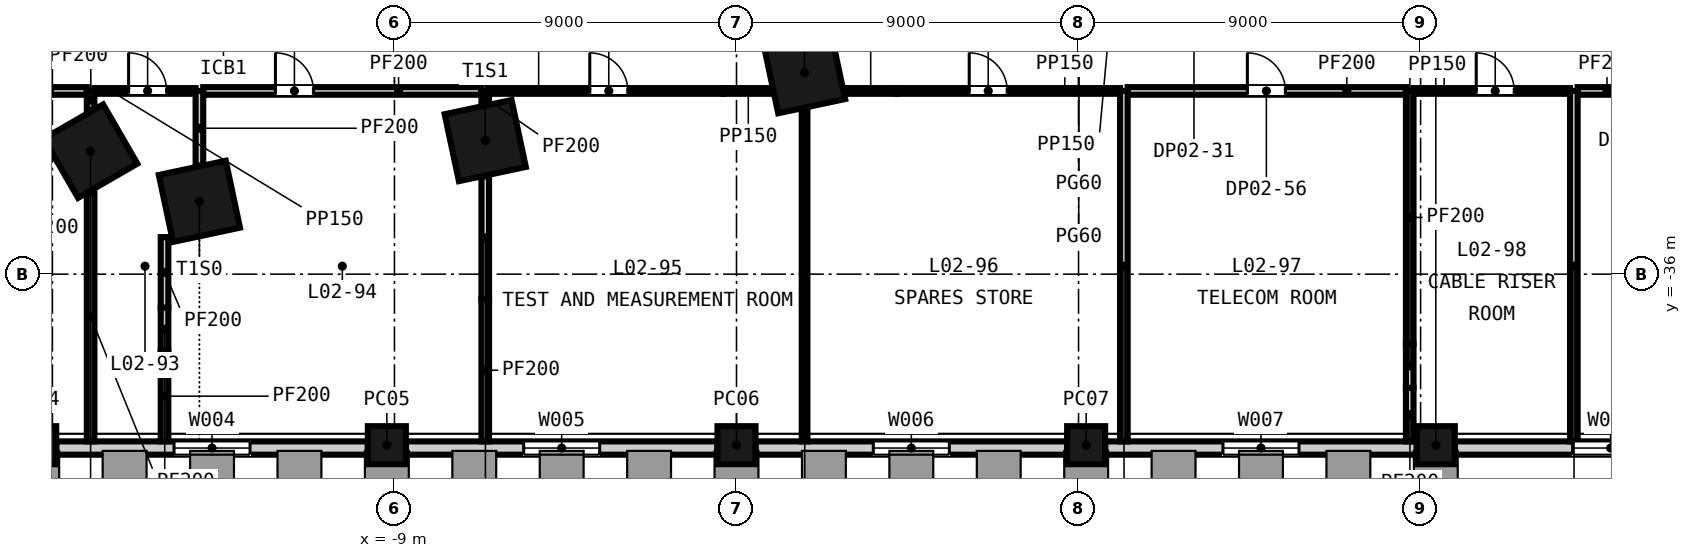
"""IFC4 building model, lengths in metres.
Left out: names, types, materials, properties, quantities, classifications, styles, units other than length and angle.
Written with IfcOpenShell. Run it as: python <this file> out.ifc"""

import sys

from ifc_helpers import new_model, si_unit, direction, frame, frame_2d, origin, origin_2d, place, context, subcontext, project, spatial, rectangle, extrude, element, fill, save


model = new_model("IFC4")
c1 = context("Model", 3, precision=1e-05, world=origin(), true_north=direction((0.0, 1.0)))
c2 = subcontext(c1, "Body", "Model", "MODEL_VIEW")
j1 = project(units=[si_unit("LENGTHUNIT", "METRE"), si_unit("PLANEANGLEUNIT", "RADIAN")], contexts=[c1])
p1 = place(None, origin())
s1 = spatial("IfcSite", under=j1, at=p1, CompositionType="ELEMENT")
p2 = place(p1, origin())
s2 = spatial("IfcBuilding", under=s1, at=p2, CompositionType="ELEMENT")
p3 = place(p2, frame((0.0, 0.0, 18.0)))
s3 = spatial("IfcBuildingStorey", under=s2, at=p3, CompositionType="ELEMENT", Elevation=18.0)
for number, where, z_axis, x_axis in (
    (1, (-16.995, -32.763, -0.4), (0.0, 0.0, 1.0), (0.5, -0.866, 0.0)),
    (2, (-14.132, -34.084, -0.4), (0.0, 0.0, 1.0), (0.978, 0.208, 0.0)),
    (3, (-6.611, -32.485, -0.4), (0.0, 0.0, 1.0), (0.978, 0.208, 0.0)),
    (4, (1.791, -30.699, -0.4), (0.0, 0.0, 1.0), (0.978, 0.208, 0.0)),
):
    element("IfcColumn", number, at=place(p3, frame(where, z_axis=z_axis, x_axis=x_axis)), inside=s3, PredefinedType="COLUMN", context=c2, shape_type="SweptSolid", body=[
        extrude(rectangle(XDim=1.8, YDim=1.8, at=origin_2d()), origin(), (0.0, 0.0, 1.0), 4.6),
    ])
for number, where, z_axis, x_axis in (
    (5, (-18.4, -40.5, -0.4), (0.0, 0.0, 1.0), (1.0, 0.0, 0.0)),
    (6, (-9.2, -40.5, -0.4), (0.0, 0.0, 1.0), (1.0, 0.0, 0.0)),
    (7, (0.0, -40.5, -0.4), (0.0, 0.0, 1.0), (1.0, 0.0, 0.0)),
    (8, (9.2, -40.5, -0.4), (0.0, 0.0, 1.0), (1.0, 0.0, 0.0)),
    (9, (18.4, -40.5, -0.4), (0.0, 0.0, 1.0), (1.0, 0.0, 0.0)),
):
    element("IfcColumn", number, at=place(p3, frame(where, z_axis=z_axis, x_axis=x_axis)), inside=s3, PredefinedType="COLUMN", context=c2, shape_type="SweptSolid", body=[
        extrude(rectangle(XDim=1.0, YDim=1.0, at=origin_2d()), origin(), (0.0, 0.0, 1.0), 4.6),
    ])
p4 = place(p3, frame((-17.9, -40.575, -0.4), z_axis=(0.0, 0.0, 1.0), x_axis=(1.0, 0.0, 0.0)))
e10 = element("IfcWall", 10, at=p4, inside=s3, PredefinedType="SOLIDWALL", context=c2, shape_type="SweptSolid", body=[
    extrude(rectangle(XDim=8.2, YDim=0.35, at=frame_2d((4.1, 0.0))), origin(), (0.0, 0.0, 1.0), 3.7),
])
p5 = place(p4, frame((3.1, 0.0, 1.3)))
e11 = element("IfcOpeningElement", 11, at=p5, cuts=e10, PredefinedType="OPENING", context=c2, shape_type="SweptSolid", body=[
    extrude(rectangle(XDim=2.0, YDim=2.35, at=frame_2d((1.0, 1.175))), frame((0.0, 0.185, 0.0), z_axis=(0.0, -1.0, 0.0), x_axis=(1.0, 0.0, 0.0)), (0.0, 0.0, 1.0), 0.37),
])
p6 = place(p3, frame((-8.7, -40.575, -0.4), z_axis=(0.0, 0.0, 1.0), x_axis=(1.0, 0.0, 0.0)))
e12 = element("IfcWall", 12, at=p6, inside=s3, PredefinedType="SOLIDWALL", context=c2, shape_type="SweptSolid", body=[
    extrude(rectangle(XDim=8.2, YDim=0.35, at=frame_2d((4.1, 0.0))), origin(), (0.0, 0.0, 1.0), 3.7),
])
p7 = place(p6, frame((3.1, 0.0, 1.3)))
e13 = element("IfcOpeningElement", 13, at=p7, cuts=e12, PredefinedType="OPENING", context=c2, shape_type="SweptSolid", body=[
    extrude(rectangle(XDim=2.0, YDim=2.35, at=frame_2d((1.0, 1.175))), frame((0.0, 0.185, 0.0), z_axis=(0.0, -1.0, 0.0), x_axis=(1.0, 0.0, 0.0)), (0.0, 0.0, 1.0), 0.37),
])
p8 = place(p3, frame((0.5, -40.575, -0.4), z_axis=(0.0, 0.0, 1.0), x_axis=(1.0, 0.0, 0.0)))
e14 = element("IfcWall", 14, at=p8, inside=s3, PredefinedType="SOLIDWALL", context=c2, shape_type="SweptSolid", body=[
    extrude(rectangle(XDim=8.2, YDim=0.35, at=frame_2d((4.1, 0.0))), origin(), (0.0, 0.0, 1.0), 3.7),
])
p9 = place(p8, frame((3.1, 0.0, 1.3)))
e15 = element("IfcOpeningElement", 15, at=p9, cuts=e14, PredefinedType="OPENING", context=c2, shape_type="SweptSolid", body=[
    extrude(rectangle(XDim=2.0, YDim=2.35, at=frame_2d((1.0, 1.175))), frame((0.0, 0.185, 0.0), z_axis=(0.0, -1.0, 0.0), x_axis=(1.0, 0.0, 0.0)), (0.0, 0.0, 1.0), 0.37),
])
p10 = place(p3, frame((9.7, -40.575, -0.4), z_axis=(0.0, 0.0, 1.0), x_axis=(1.0, 0.0, 0.0)))
e16 = element("IfcWall", 16, at=p10, inside=s3, PredefinedType="SOLIDWALL", context=c2, shape_type="SweptSolid", body=[
    extrude(rectangle(XDim=8.2, YDim=0.35, at=frame_2d((4.1, 0.0))), origin(), (0.0, 0.0, 1.0), 3.7),
])
p11 = place(p10, frame((3.1, 0.0, 1.3)))
e17 = element("IfcOpeningElement", 17, at=p11, cuts=e16, PredefinedType="OPENING", context=c2, shape_type="SweptSolid", body=[
    extrude(rectangle(XDim=2.0, YDim=2.35, at=frame_2d((1.0, 1.175))), frame((0.0, 0.185, 0.0), z_axis=(0.0, -1.0, 0.0), x_axis=(1.0, 0.0, 0.0)), (0.0, 0.0, 1.0), 0.37),
])
p12 = place(p3, frame((18.9, -40.575, -0.4), z_axis=(0.0, 0.0, 1.0), x_axis=(1.0, 0.0, 0.0)))
e18 = element("IfcWall", 18, at=p12, inside=s3, PredefinedType="SOLIDWALL", context=c2, shape_type="SweptSolid", body=[
    extrude(rectangle(XDim=8.2, YDim=0.35, at=frame_2d((4.1, 0.0))), origin(), (0.0, 0.0, 1.0), 3.7),
])
p13 = place(p12, frame((3.1, 0.0, 1.3)))
e19 = element("IfcOpeningElement", 19, at=p13, cuts=e18, PredefinedType="OPENING", context=c2, shape_type="SweptSolid", body=[
    extrude(rectangle(XDim=2.0, YDim=2.35, at=frame_2d((1.0, 1.175))), frame((0.0, 0.185, 0.0), z_axis=(0.0, -1.0, 0.0), x_axis=(1.0, 0.0, 0.0)), (0.0, 0.0, 1.0), 0.37),
])
p14 = place(p3, frame((-19.065, -31.179, 0.0), z_axis=(0.0, 0.0, 1.0), x_axis=(1.0, 0.0, 0.0)))
e20 = element("IfcWall", 20, at=p14, inside=s3, PredefinedType="PARTITIONING", context=c2, shape_type="SweptSolid", body=[
    extrude(rectangle(XDim=1.97, YDim=0.2, at=frame_2d((0.985, 0.0))), origin(), (0.0, 0.0, 1.0), 3.2),
])
p15 = place(p3, frame((-16.895, -31.179, 0.0), z_axis=(0.0, 0.0, 1.0), x_axis=(1.0, 0.0, 0.0)))
e21 = element("IfcWall", 21, at=p15, inside=s3, PredefinedType="PARTITIONING", context=c2, shape_type="SweptSolid", body=[
    extrude(rectangle(XDim=2.663, YDim=0.15, at=frame_2d((1.332, 0.0))), origin(), (0.0, 0.0, 1.0), 4.2),
])
p16 = place(p15, frame((0.9, 0.0, 0.0)))
e22 = element("IfcOpeningElement", 22, at=p16, cuts=e21, PredefinedType="OPENING", context=c2, shape_type="SweptSolid", body=[
    extrude(rectangle(XDim=1.0, YDim=2.1, at=frame_2d((0.5, 1.05))), frame((0.0, 0.085, 0.0), z_axis=(0.0, -1.0, 0.0), x_axis=(1.0, 0.0, 0.0)), (0.0, 0.0, 1.0), 0.17),
])
p17 = place(p3, frame((-14.032, -31.179, 0.0), z_axis=(0.0, 0.0, 1.0), x_axis=(1.0, 0.0, 0.0)))
e23 = element("IfcWall", 23, at=p17, inside=s3, PredefinedType="PARTITIONING", context=c2, shape_type="SweptSolid", body=[
    extrude(rectangle(XDim=7.321, YDim=0.2, at=frame_2d((3.661, 0.0))), origin(), (0.0, 0.0, 1.0), 4.2),
])
p18 = place(p17, frame((1.9, 0.0, 0.0)))
e24 = element("IfcOpeningElement", 24, at=p18, cuts=e23, PredefinedType="OPENING", context=c2, shape_type="SweptSolid", body=[
    extrude(rectangle(XDim=1.0, YDim=2.1, at=frame_2d((0.5, 1.05))), frame((0.0, 0.11, 0.0), z_axis=(0.0, -1.0, 0.0), x_axis=(1.0, 0.0, 0.0)), (0.0, 0.0, 1.0), 0.22),
])
p19 = place(p3, frame((-6.511, -31.179, 0.0), z_axis=(0.0, 0.0, 1.0), x_axis=(1.0, 0.0, 0.0)))
e25 = element("IfcWall", 25, at=p19, inside=s3, PredefinedType="PARTITIONING", context=c2, shape_type="SweptSolid", body=[
    extrude(rectangle(XDim=6.165, YDim=0.15, at=frame_2d((3.083, 0.0))), origin(), (0.0, 0.0, 1.0), 4.2),
])
p20 = place(p19, frame((2.65, 0.0, 0.0)))
e26 = element("IfcOpeningElement", 26, at=p20, cuts=e25, PredefinedType="OPENING", context=c2, shape_type="SweptSolid", body=[
    extrude(rectangle(XDim=1.0, YDim=2.1, at=frame_2d((0.5, 1.05))), frame((0.0, 0.085, 0.0), z_axis=(0.0, -1.0, 0.0), x_axis=(1.0, 0.0, 0.0)), (0.0, 0.0, 1.0), 0.17),
])
p21 = place(p3, frame((-0.346, -31.179, 0.0), z_axis=(0.0, 0.0, 1.0), x_axis=(1.0, 0.0, 0.0)))
e27 = element("IfcWall", 27, at=p21, inside=s3, PredefinedType="PARTITIONING", context=c2, shape_type="SweptSolid", body=[
    extrude(rectangle(XDim=1.302, YDim=0.15, at=frame_2d((0.651, 0.0))), origin(), (0.0, 0.0, 1.0), 3.2),
])
p22 = place(p3, frame((2.829, -31.179, 0.0), z_axis=(0.0, 0.0, 1.0), x_axis=(1.0, 0.0, 0.0)))
e28 = element("IfcWall", 28, at=p22, inside=s3, PredefinedType="PARTITIONING", context=c2, shape_type="SweptSolid", body=[
    extrude(rectangle(XDim=1.395, YDim=0.15, at=frame_2d((0.697, 0.0))), origin(), (0.0, 0.0, 1.0), 3.2),
])
p23 = place(p3, frame((4.223, -31.179, 0.0), z_axis=(0.0, 0.0, 1.0), x_axis=(1.0, 0.0, 0.0)))
e29 = element("IfcWall", 29, at=p23, inside=s3, PredefinedType="PARTITIONING", context=c2, shape_type="SweptSolid", body=[
    extrude(rectangle(XDim=5.869, YDim=0.15, at=frame_2d((2.935, 0.0))), origin(), (0.0, 0.0, 1.0), 4.2),
])
p24 = place(p23, frame((1.9, 0.0, 0.0)))
e30 = element("IfcOpeningElement", 30, at=p24, cuts=e29, PredefinedType="OPENING", context=c2, shape_type="SweptSolid", body=[
    extrude(rectangle(XDim=1.0, YDim=2.1, at=frame_2d((0.5, 1.05))), frame((0.0, 0.085, 0.0), z_axis=(0.0, -1.0, 0.0), x_axis=(1.0, 0.0, 0.0)), (0.0, 0.0, 1.0), 0.17),
])
p25 = place(p3, frame((10.292, -31.179, 0.0), z_axis=(0.0, 0.0, 1.0), x_axis=(1.0, 0.0, 0.0)))
e31 = element("IfcWall", 31, at=p25, inside=s3, PredefinedType="PARTITIONING", context=c2, shape_type="SweptSolid", body=[
    extrude(rectangle(XDim=7.322, YDim=0.2, at=frame_2d((3.661, 0.0))), origin(), (0.0, 0.0, 1.0), 4.2),
])
p26 = place(p25, frame((3.15, 0.0, 0.0)))
e32 = element("IfcOpeningElement", 32, at=p26, cuts=e31, PredefinedType="OPENING", context=c2, shape_type="SweptSolid", body=[
    extrude(rectangle(XDim=1.0, YDim=2.1, at=frame_2d((0.5, 1.05))), frame((0.0, 0.11, 0.0), z_axis=(0.0, -1.0, 0.0), x_axis=(1.0, 0.0, 0.0)), (0.0, 0.0, 1.0), 0.22),
])
p27 = place(p3, frame((17.814, -31.179, 0.0), z_axis=(0.0, 0.0, 1.0), x_axis=(1.0, 0.0, 0.0)))
e33 = element("IfcWall", 33, at=p27, inside=s3, PredefinedType="PARTITIONING", context=c2, shape_type="SweptSolid", body=[
    extrude(rectangle(XDim=4.118, YDim=0.15, at=frame_2d((2.059, 0.0))), origin(), (0.0, 0.0, 1.0), 4.2),
])
p28 = place(p27, frame((1.65, 0.0, 0.0)))
e34 = element("IfcOpeningElement", 34, at=p28, cuts=e33, PredefinedType="OPENING", context=c2, shape_type="SweptSolid", body=[
    extrude(rectangle(XDim=1.0, YDim=2.1, at=frame_2d((0.5, 1.05))), frame((0.0, 0.085, 0.0), z_axis=(0.0, -1.0, 0.0), x_axis=(1.0, 0.0, 0.0)), (0.0, 0.0, 1.0), 0.17),
])
p29 = place(p3, frame((22.132, -31.179, 0.0), z_axis=(0.0, 0.0, 1.0), x_axis=(1.0, 0.0, 0.0)))
e35 = element("IfcWall", 35, at=p29, inside=s3, PredefinedType="PARTITIONING", context=c2, shape_type="SweptSolid", body=[
    extrude(rectangle(XDim=1.537, YDim=0.2, at=frame_2d((0.769, 0.0))), origin(), (0.0, 0.0, 1.0), 3.111),
])
p30 = place(p3, frame((-16.995, -40.4, 0.0), z_axis=(0.0, 0.0, 1.0), x_axis=(0.0, 1.0, 0.0)))
e36 = element("IfcWall", 36, at=p30, inside=s3, PredefinedType="PARTITIONING", context=c2, shape_type="SweptSolid", body=[
    extrude(rectangle(XDim=6.54, YDim=0.2, at=frame_2d((3.27, 0.0))), origin(), (0.0, 0.0, 1.0), 4.2),
])
p31 = place(p3, frame((-16.995, -31.666, 0.0), z_axis=(0.0, 0.0, 1.0), x_axis=(0.0, 1.0, 0.0)))
e37 = element("IfcWall", 37, at=p31, inside=s3, PredefinedType="PARTITIONING", context=c2, shape_type="SweptSolid", body=[
    extrude(rectangle(XDim=0.487, YDim=0.2, at=frame_2d((0.244, 0.0))), origin(), (0.0, 0.0, 1.0), 4.2),
])
p32 = place(p3, frame((-15.05, -40.4, 0.0), z_axis=(0.0, 0.0, 1.0), x_axis=(0.0, 1.0, 0.0)))
e38 = element("IfcWall", 38, at=p32, inside=s3, PredefinedType="PARTITIONING", context=c2, shape_type="SweptSolid", body=[
    extrude(rectangle(XDim=2.38, YDim=0.2, at=frame_2d((1.19, 0.0))), origin(), (0.0, 0.0, 1.0), 4.2),
])
p33 = place(p3, frame((-15.05, -38.02, 0.0), z_axis=(0.0, 0.0, 1.0), x_axis=(0.0, 1.0, 0.0)))
e39 = element("IfcWall", 39, at=p33, inside=s3, PredefinedType="PARTITIONING", context=c2, shape_type="SweptSolid", body=[
    extrude(rectangle(XDim=1.14, YDim=0.2, at=frame_2d((0.57, 0.0))), origin(), (0.0, 0.0, 1.0), 3.749),
])
p34 = place(p3, frame((-15.05, -36.879, 0.0), z_axis=(0.0, 0.0, 1.0), x_axis=(0.0, 1.0, 0.0)))
e40 = element("IfcWall", 40, at=p34, inside=s3, PredefinedType="PARTITIONING", context=c2, shape_type="SweptSolid", body=[
    extrude(rectangle(XDim=1.854, YDim=0.2, at=frame_2d((0.927, 0.0))), origin(), (0.0, 0.0, 1.0), 4.2),
])
p35 = place(p3, frame((-14.132, -33.142, 0.0), z_axis=(0.0, 0.0, 1.0), x_axis=(0.0, 1.0, 0.0)))
e41 = element("IfcWall", 41, at=p35, inside=s3, PredefinedType="PARTITIONING", context=c2, shape_type="SweptSolid", body=[
    extrude(rectangle(XDim=1.963, YDim=0.2, at=frame_2d((0.982, 0.0))), origin(), (0.0, 0.0, 1.0), 4.2),
])
p36 = place(p3, frame((-6.611, -40.4, 0.0), z_axis=(0.0, 0.0, 1.0), x_axis=(0.0, 1.0, 0.0)))
e42 = element("IfcWall", 42, at=p36, inside=s3, PredefinedType="PARTITIONING", context=c2, shape_type="SweptSolid", body=[
    extrude(rectangle(XDim=3.745, YDim=0.2, at=frame_2d((1.872, 0.0))), origin(), (0.0, 0.0, 1.0), 4.2),
])
p37 = place(p3, frame((-6.611, -36.655, 0.0), z_axis=(0.0, 0.0, 1.0), x_axis=(0.0, 1.0, 0.0)))
e43 = element("IfcWall", 43, at=p37, inside=s3, PredefinedType="PARTITIONING", context=c2, shape_type="SweptSolid", body=[
    extrude(rectangle(XDim=3.229, YDim=0.2, at=frame_2d((1.614, 0.0))), origin(), (0.0, 0.0, 1.0), 3.676),
])
p38 = place(p3, frame((-6.611, -31.544, 0.0), z_axis=(0.0, 0.0, 1.0), x_axis=(0.0, 1.0, 0.0)))
e44 = element("IfcWall", 44, at=p38, inside=s3, PredefinedType="PARTITIONING", context=c2, shape_type="SweptSolid", body=[
    extrude(rectangle(XDim=0.365, YDim=0.2, at=frame_2d((0.182, 0.0))), origin(), (0.0, 0.0, 1.0), 4.2),
])
p39 = place(p3, frame((1.791, -40.4, 0.0), z_axis=(0.0, 0.0, 1.0), x_axis=(0.0, 1.0, 0.0)))
e45 = element("IfcWall", 45, at=p39, inside=s3, PredefinedType="PARTITIONING", context=c2, shape_type="SweptSolid", body=[
    extrude(rectangle(XDim=8.765, YDim=0.15, at=frame_2d((4.382, 0.0))), origin(), (0.0, 0.0, 1.0), 4.2),
])
p40 = place(p3, frame((10.192, -40.4, 0.0), z_axis=(0.0, 0.0, 1.0), x_axis=(0.0, 1.0, 0.0)))
e46 = element("IfcWall", 46, at=p40, inside=s3, PredefinedType="PARTITIONING", context=c2, shape_type="SweptSolid", body=[
    extrude(rectangle(XDim=9.221, YDim=0.2, at=frame_2d((4.61, 0.0))), origin(), (0.0, 0.0, 1.0), 4.2),
])
p41 = place(p3, frame((17.714, -40.4, 0.0), z_axis=(0.0, 0.0, 1.0), x_axis=(0.0, 1.0, 0.0)))
e47 = element("IfcWall", 47, at=p41, inside=s3, PredefinedType="PARTITIONING", context=c2, shape_type="SweptSolid", body=[
    extrude(rectangle(XDim=1.41, YDim=0.2, at=frame_2d((0.705, 0.0))), origin(), (0.0, 0.0, 1.0), 4.2),
])
p42 = place(p3, frame((17.714, -38.99, 0.0), z_axis=(0.0, 0.0, 1.0), x_axis=(0.0, 1.0, 0.0)))
e48 = element("IfcWall", 48, at=p42, inside=s3, PredefinedType="PARTITIONING", context=c2, shape_type="SweptSolid", body=[
    extrude(rectangle(XDim=1.155, YDim=0.2, at=frame_2d((0.578, 0.0))), origin(), (0.0, 0.0, 1.0), 3.521),
])
p43 = place(p3, frame((17.714, -37.835, 0.0), z_axis=(0.0, 0.0, 1.0), x_axis=(0.0, 1.0, 0.0)))
e49 = element("IfcWall", 49, at=p43, inside=s3, PredefinedType="PARTITIONING", context=c2, shape_type="SweptSolid", body=[
    extrude(rectangle(XDim=6.656, YDim=0.2, at=frame_2d((3.328, 0.0))), origin(), (0.0, 0.0, 1.0), 4.2),
])
p44 = place(p3, frame((22.032, -40.4, 0.0), z_axis=(0.0, 0.0, 1.0), x_axis=(0.0, 1.0, 0.0)))
e50 = element("IfcWall", 50, at=p44, inside=s3, PredefinedType="PARTITIONING", context=c2, shape_type="SweptSolid", body=[
    extrude(rectangle(XDim=9.221, YDim=0.2, at=frame_2d((4.61, 0.0))), origin(), (0.0, 0.0, 1.0), 4.2),
])
p45 = place(p5, origin())
e51 = element("IfcWindow", 51, at=p45, inside=s3, PartitioningType="SINGLE_PANEL", PredefinedType="WINDOW", context=c2, shape_type="SweptSolid", body=[
    extrude(rectangle(XDim=2.0, YDim=2.35, at=frame_2d((1.0, 1.175))), frame((0.0, 0.03, 0.0), z_axis=(0.0, -1.0, 0.0), x_axis=(1.0, 0.0, 0.0)), (0.0, 0.0, 1.0), 0.06),
])
fill(e11, e51)
p46 = place(p7, origin())
e52 = element("IfcWindow", 52, at=p46, inside=s3, PartitioningType="SINGLE_PANEL", PredefinedType="WINDOW", context=c2, shape_type="SweptSolid", body=[
    extrude(rectangle(XDim=2.0, YDim=2.35, at=frame_2d((1.0, 1.175))), frame((0.0, 0.03, 0.0), z_axis=(0.0, -1.0, 0.0), x_axis=(1.0, 0.0, 0.0)), (0.0, 0.0, 1.0), 0.06),
])
fill(e13, e52)
p47 = place(p9, origin())
e53 = element("IfcWindow", 53, at=p47, inside=s3, PartitioningType="SINGLE_PANEL", PredefinedType="WINDOW", context=c2, shape_type="SweptSolid", body=[
    extrude(rectangle(XDim=2.0, YDim=2.35, at=frame_2d((1.0, 1.175))), frame((0.0, 0.03, 0.0), z_axis=(0.0, -1.0, 0.0), x_axis=(1.0, 0.0, 0.0)), (0.0, 0.0, 1.0), 0.06),
])
fill(e15, e53)
p48 = place(p11, origin())
e54 = element("IfcWindow", 54, at=p48, inside=s3, PartitioningType="SINGLE_PANEL", PredefinedType="WINDOW", context=c2, shape_type="SweptSolid", body=[
    extrude(rectangle(XDim=2.0, YDim=2.35, at=frame_2d((1.0, 1.175))), frame((0.0, 0.03, 0.0), z_axis=(0.0, -1.0, 0.0), x_axis=(1.0, 0.0, 0.0)), (0.0, 0.0, 1.0), 0.06),
])
fill(e17, e54)
p49 = place(p13, origin())
e55 = element("IfcWindow", 55, at=p49, inside=s3, PartitioningType="SINGLE_PANEL", PredefinedType="WINDOW", context=c2, shape_type="SweptSolid", body=[
    extrude(rectangle(XDim=2.0, YDim=2.35, at=frame_2d((1.0, 1.175))), frame((0.0, 0.03, 0.0), z_axis=(0.0, -1.0, 0.0), x_axis=(1.0, 0.0, 0.0)), (0.0, 0.0, 1.0), 0.06),
])
fill(e19, e55)
p50 = place(p16, origin())
e56 = element("IfcDoor", 56, at=p50, inside=s3, OperationType="SINGLE_SWING_LEFT", PredefinedType="DOOR", context=c2, shape_type="SweptSolid", body=[
    extrude(rectangle(XDim=1.0, YDim=2.1, at=frame_2d((0.5, 1.05))), frame((0.0, 0.025, 0.0), z_axis=(0.0, -1.0, 0.0), x_axis=(1.0, 0.0, 0.0)), (0.0, 0.0, 1.0), 0.05),
])
fill(e22, e56)
p51 = place(p18, origin())
e57 = element("IfcDoor", 57, at=p51, inside=s3, OperationType="SINGLE_SWING_LEFT", PredefinedType="DOOR", context=c2, shape_type="SweptSolid", body=[
    extrude(rectangle(XDim=1.0, YDim=2.1, at=frame_2d((0.5, 1.05))), frame((0.0, 0.025, 0.0), z_axis=(0.0, -1.0, 0.0), x_axis=(1.0, 0.0, 0.0)), (0.0, 0.0, 1.0), 0.05),
])
fill(e24, e57)
p52 = place(p20, origin())
e58 = element("IfcDoor", 58, at=p52, inside=s3, OperationType="SINGLE_SWING_LEFT", PredefinedType="DOOR", context=c2, shape_type="SweptSolid", body=[
    extrude(rectangle(XDim=1.0, YDim=2.1, at=frame_2d((0.5, 1.05))), frame((0.0, 0.025, 0.0), z_axis=(0.0, -1.0, 0.0), x_axis=(1.0, 0.0, 0.0)), (0.0, 0.0, 1.0), 0.05),
])
fill(e26, e58)
p53 = place(p24, origin())
e59 = element("IfcDoor", 59, at=p53, inside=s3, OperationType="SINGLE_SWING_LEFT", PredefinedType="DOOR", context=c2, shape_type="SweptSolid", body=[
    extrude(rectangle(XDim=1.0, YDim=2.1, at=frame_2d((0.5, 1.05))), frame((0.0, 0.025, 0.0), z_axis=(0.0, -1.0, 0.0), x_axis=(1.0, 0.0, 0.0)), (0.0, 0.0, 1.0), 0.05),
])
fill(e30, e59)
p54 = place(p26, origin())
e60 = element("IfcDoor", 60, at=p54, inside=s3, OperationType="SINGLE_SWING_LEFT", PredefinedType="DOOR", context=c2, shape_type="SweptSolid", body=[
    extrude(rectangle(XDim=1.0, YDim=2.1, at=frame_2d((0.5, 1.05))), frame((0.0, 0.025, 0.0), z_axis=(0.0, -1.0, 0.0), x_axis=(1.0, 0.0, 0.0)), (0.0, 0.0, 1.0), 0.05),
])
fill(e32, e60)
p55 = place(p28, origin())
e61 = element("IfcDoor", 61, at=p55, inside=s3, OperationType="SINGLE_SWING_LEFT", PredefinedType="DOOR", context=c2, shape_type="SweptSolid", body=[
    extrude(rectangle(XDim=1.0, YDim=2.1, at=frame_2d((0.5, 1.05))), frame((0.0, 0.025, 0.0), z_axis=(0.0, -1.0, 0.0), x_axis=(1.0, 0.0, 0.0)), (0.0, 0.0, 1.0), 0.05),
])
fill(e34, e61)
save(model, sys.argv[1])
